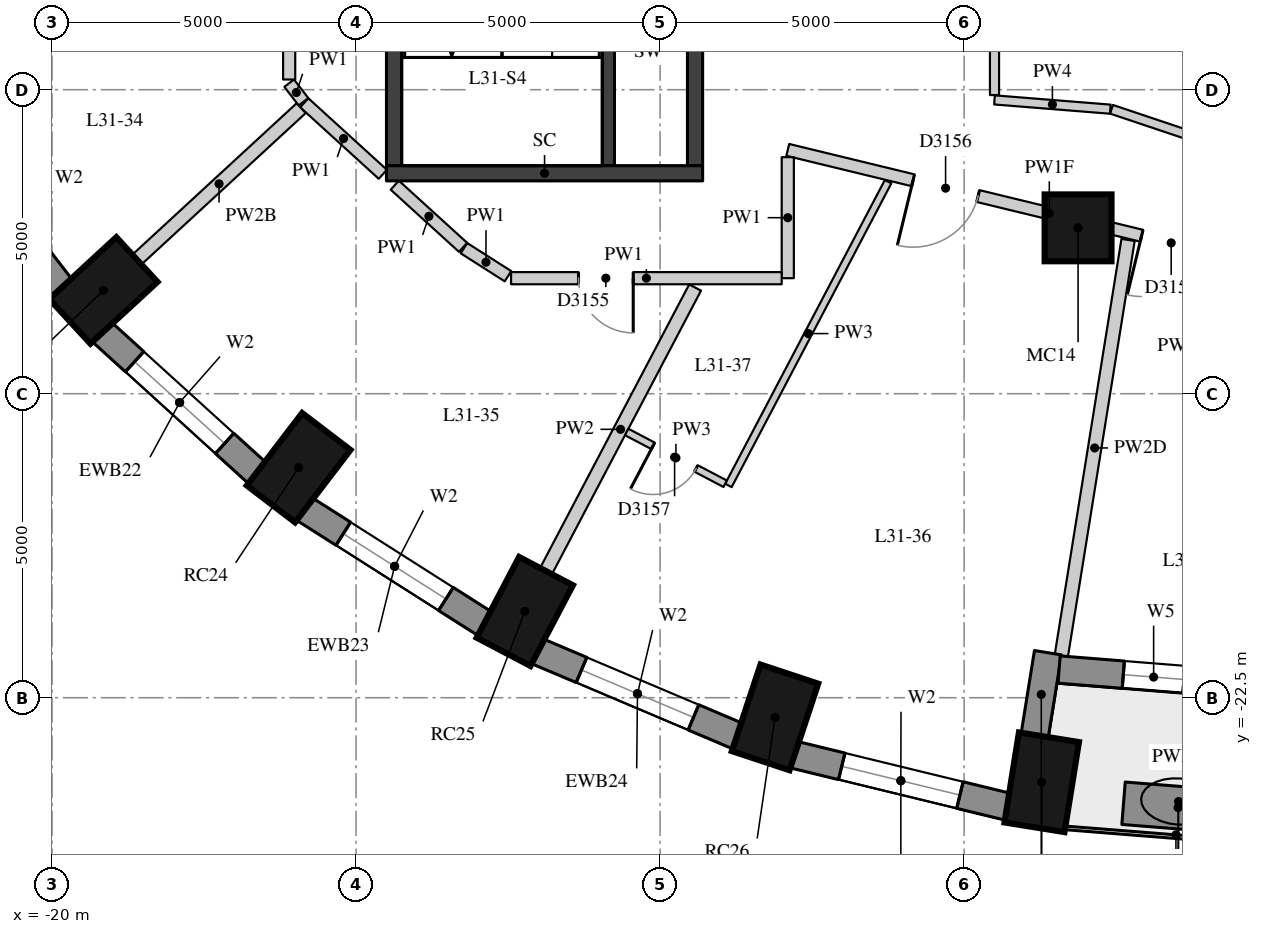
"""IFC4 building model, lengths in metres.
Left out: names, types, materials, properties, quantities, classifications, styles, units other than length and angle.
Written with IfcOpenShell. Run it as: python <this file> out.ifc"""

import sys

from ifc_helpers import new_model, si_unit, direction, frame, frame_2d, origin, origin_2d, place, context, subcontext, project, spatial, rectangle, extrude, element, fill, save


model = new_model("IFC4")
c1 = context("Model", 3, precision=1e-05, world=origin(), true_north=direction((0.0, 1.0)))
c2 = subcontext(c1, "Body", "Model", "MODEL_VIEW")
j1 = project(units=[si_unit("LENGTHUNIT", "METRE"), si_unit("PLANEANGLEUNIT", "RADIAN")], contexts=[c1])
p1 = place(None, origin())
s1 = spatial("IfcSite", under=j1, at=p1, CompositionType="ELEMENT")
p2 = place(p1, origin())
s2 = spatial("IfcBuilding", under=s1, at=p2, CompositionType="ELEMENT")
p3 = place(p2, frame((0.0, 0.0, 112.0)))
s3 = spatial("IfcBuildingStorey", under=s2, at=p3, CompositionType="ELEMENT", Elevation=112.0)
for number, where, z_axis, x_axis in (
    (1, (-19.156, -15.802, 0.0), (0.0, 0.0, 1.0), (-0.735, -0.678, 0.0)),
    (2, (-15.945, -18.717, 0.0), (0.0, 0.0, 1.0), (-0.607, -0.795, 0.0)),
    (3, (-12.225, -21.082, 0.0), (0.0, 0.0, 1.0), (-0.465, -0.885, 0.0)),
    (4, (-8.11, -22.824, 0.0), (0.0, 0.0, 1.0), (-0.315, -0.949, 0.0)),
    (5, (-3.724, -23.891, 0.0), (0.0, 0.0, 1.0), (-0.159, -0.987, 0.0)),
):
    element("IfcColumn", number, at=place(p3, frame(where, z_axis=z_axis, x_axis=x_axis)), inside=s3, PredefinedType="COLUMN", context=c2, shape_type="SweptSolid", body=[
        extrude(rectangle(XDim=1.5, YDim=1.0, at=origin_2d()), origin(), (0.0, 0.0, 1.0), 3.3),
    ])
p4 = place(p3, frame((-3.126, -14.772, 0.0), z_axis=(0.0, 0.0, 1.0), x_axis=(1.0, 0.0, 0.0)))
e6 = element("IfcColumn", 6, at=p4, inside=s3, PredefinedType="COLUMN", context=c2, shape_type="SweptSolid", body=[
    extrude(rectangle(XDim=1.1, YDim=1.1, at=origin_2d()), origin(), (0.0, 0.0, 1.0), 3.3),
])
p5 = place(p3, frame((-21.908, -13.087, 0.0), z_axis=(0.0, 0.0, 1.0), x_axis=(0.610693945156, -0.791866721961, 0.0)))
e7 = element("IfcWall", 7, at=p5, inside=s3, PredefinedType="SOLIDWALL", context=c2, shape_type="SweptSolid", body=[
    extrude(rectangle(XDim=3.395, YDim=0.45, at=frame_2d((1.697, 0.0))), origin(), (0.0, 0.0, 1.0), 3.02),
])
p6 = place(p5, frame((0.697, 0.0, 0.4)))
e8 = element("IfcOpeningElement", 8, at=p6, cuts=e7, PredefinedType="OPENING", context=c2, shape_type="SweptSolid", body=[
    extrude(rectangle(XDim=2.0, YDim=1.75, at=frame_2d((1.0, 0.875))), frame((0.0, 0.235, 0.0), z_axis=(0.0, -1.0, 0.0), x_axis=(1.0, 0.0, 0.0)), (0.0, 0.0, 1.0), 0.47),
])
p7 = place(p3, frame((-19.184, -16.481, 0.0), z_axis=(0.0, 0.0, 1.0), x_axis=(0.740364106106, -0.672206062446, 0.0)))
e9 = element("IfcWall", 9, at=p7, inside=s3, PredefinedType="SOLIDWALL", context=c2, shape_type="SweptSolid", body=[
    extrude(rectangle(XDim=3.464, YDim=0.45, at=frame_2d((1.732, 0.0))), origin(), (0.0, 0.0, 1.0), 3.02),
])
p8 = place(p7, frame((0.732, 0.0, 0.4)))
e10 = element("IfcOpeningElement", 10, at=p8, cuts=e9, PredefinedType="OPENING", context=c2, shape_type="SweptSolid", body=[
    extrude(rectangle(XDim=2.0, YDim=1.75, at=frame_2d((1.0, 0.875))), frame((0.0, 0.235, 0.0), z_axis=(0.0, -1.0, 0.0), x_axis=(1.0, 0.0, 0.0)), (0.0, 0.0, 1.0), 0.47),
])
p9 = place(p3, frame((-15.856, -19.392, 0.0), z_axis=(0.0, 0.0, 1.0), x_axis=(0.843891947083, -0.53651317006, 0.0)))
e11 = element("IfcWall", 11, at=p9, inside=s3, PredefinedType="SOLIDWALL", context=c2, shape_type="SweptSolid", body=[
    extrude(rectangle(XDim=3.532, YDim=0.45, at=frame_2d((1.766, 0.0))), origin(), (0.0, 0.0, 1.0), 3.02),
])
p10 = place(p9, frame((0.766, 0.0, 0.4)))
e12 = element("IfcOpeningElement", 12, at=p10, cuts=e11, PredefinedType="OPENING", context=c2, shape_type="SweptSolid", body=[
    extrude(rectangle(XDim=2.0, YDim=1.75, at=frame_2d((1.0, 0.875))), frame((0.0, 0.235, 0.0), z_axis=(0.0, -1.0, 0.0), x_axis=(1.0, 0.0, 0.0)), (0.0, 0.0, 1.0), 0.47),
])
p11 = place(p3, frame((-12.025, -21.733, 0.0), z_axis=(0.0, 0.0, 1.0), x_axis=(0.920879975612, -0.389846213932, 0.0)))
e13 = element("IfcWall", 13, at=p11, inside=s3, PredefinedType="SOLIDWALL", context=c2, shape_type="SweptSolid", body=[
    extrude(rectangle(XDim=3.592, YDim=0.45, at=frame_2d((1.796, 0.0))), origin(), (0.0, 0.0, 1.0), 3.02),
])
p12 = place(p11, frame((0.796, 0.0, 0.4)))
e14 = element("IfcOpeningElement", 14, at=p12, cuts=e13, PredefinedType="OPENING", context=c2, shape_type="SweptSolid", body=[
    extrude(rectangle(XDim=2.0, YDim=1.75, at=frame_2d((1.0, 0.875))), frame((0.0, 0.235, 0.0), z_axis=(0.0, -1.0, 0.0), x_axis=(1.0, 0.0, 0.0)), (0.0, 0.0, 1.0), 0.47),
])
p13 = place(p3, frame((-7.807, -23.435, 0.0), z_axis=(0.0, 0.0, 1.0), x_axis=(0.971667603162, -0.236351579148, 0.0)))
e15 = element("IfcWall", 15, at=p13, inside=s3, PredefinedType="SOLIDWALL", context=c2, shape_type="SweptSolid", body=[
    extrude(rectangle(XDim=3.635, YDim=0.45, at=frame_2d((1.817, 0.0))), origin(), (0.0, 0.0, 1.0), 3.02),
])
p14 = place(p13, frame((0.817, 0.0, 0.4)))
e16 = element("IfcOpeningElement", 16, at=p14, cuts=e15, PredefinedType="OPENING", context=c2, shape_type="SweptSolid", body=[
    extrude(rectangle(XDim=2.0, YDim=1.75, at=frame_2d((1.0, 0.875))), frame((0.0, 0.235, 0.0), z_axis=(0.0, -1.0, 0.0), x_axis=(1.0, 0.0, 0.0)), (0.0, 0.0, 1.0), 0.47),
])
p15 = place(p3, frame((-3.841, -23.132, 0.0), z_axis=(0.0, 0.0, 1.0), x_axis=(0.158442643832, 0.987368182906, 0.0)))
e17 = element("IfcWall", 17, at=p15, inside=s3, PredefinedType="SOLIDWALL", context=c2, shape_type="SweptSolid", body=[
    extrude(rectangle(XDim=1.39, YDim=0.45, at=frame_2d((0.695, 0.0))), origin(), (0.0, 0.0, 1.0), 2.47),
])
p16 = place(p3, frame((-3.438, -22.037, 0.0), z_axis=(0.0, 0.0, 1.0), x_axis=(0.996844307919, -0.079381520332, 0.0)))
e18 = element("IfcWall", 18, at=p16, inside=s3, PredefinedType="SOLIDWALL", context=c2, shape_type="SweptSolid", body=[
    extrude(rectangle(XDim=4.269, YDim=0.45, at=frame_2d((2.134, 0.0))), origin(), (0.0, 0.0, 1.0), 3.02),
])
p17 = place(p16, frame((1.06, 0.0, 0.4)))
e19 = element("IfcOpeningElement", 19, at=p17, cuts=e18, PredefinedType="OPENING", context=c2, shape_type="SweptSolid", body=[
    extrude(rectangle(XDim=1.0, YDim=1.75, at=frame_2d((0.5, 0.875))), frame((0.0, 0.235, 0.0), z_axis=(0.0, -1.0, 0.0), x_axis=(1.0, 0.0, 0.0)), (0.0, 0.0, 1.0), 0.47),
])
p18 = place(p16, frame((2.209, 0.0, 0.0)))
e20 = element("IfcOpeningElement", 20, at=p18, cuts=e18, PredefinedType="OPENING", context=c2, shape_type="SweptSolid", body=[
    extrude(rectangle(XDim=1.0, YDim=2.15, at=frame_2d((0.5, 1.075))), frame((0.0, 0.235, 0.0), z_axis=(0.0, -1.0, 0.0), x_axis=(1.0, 0.0, 0.0)), (0.0, 0.0, 1.0), 0.47),
])
p19 = place(p3, frame((-2.378, -24.236, 0.0), z_axis=(0.0, 0.0, 1.0), x_axis=(0.996858257414, -0.079206152698, 0.0)))
e21 = element("IfcWall", 21, at=p19, inside=s3, PredefinedType="USERDEFINED", context=c2, shape_type="SweptSolid", body=[
    extrude(rectangle(XDim=1.8, YDim=0.7, at=frame_2d((0.9, 0.0))), origin(), (0.0, 0.0, 1.0), 0.75),
])
p20 = place(p3, frame((-10.85, -13.75, 0.0), z_axis=(0.0, 0.0, 1.0), x_axis=(0.0, 1.0, 0.0)))
e22 = element("IfcWall", 22, at=p20, inside=s3, PredefinedType="SHEAR", context=c2, shape_type="SweptSolid", body=[
    extrude(rectangle(XDim=6.0, YDim=0.2, at=frame_2d((3.0, 0.0))), origin(), (0.0, 0.0, 1.0), 3.02),
])
p21 = place(p20, frame((4.4, 0.0, 0.0)))
e23 = element("IfcOpeningElement", 23, at=p21, cuts=e22, PredefinedType="OPENING", context=c2, shape_type="SweptSolid", body=[
    extrude(rectangle(XDim=1.5, YDim=2.1, at=frame_2d((0.75, 1.05))), frame((0.0, 0.11, 0.0), z_axis=(0.0, -1.0, 0.0), x_axis=(1.0, 0.0, 0.0)), (0.0, 0.0, 1.0), 0.22),
])
p22 = place(p3, frame((-14.375, -13.75, -0.28), z_axis=(0.0, 0.0, 1.0), x_axis=(0.0, 1.0, 0.0)))
e24 = element("IfcWall", 24, at=p22, inside=s3, PredefinedType="SHEAR", context=c2, shape_type="SweptSolid", body=[
    extrude(rectangle(XDim=6.0, YDim=0.25, at=frame_2d((3.0, 0.0))), origin(), (0.0, 0.0, 1.0), 3.3),
])
p23 = place(p3, frame((-9.425, -13.75, -0.28), z_axis=(0.0, 0.0, 1.0), x_axis=(0.0, 1.0, 0.0)))
e25 = element("IfcWall", 25, at=p23, inside=s3, PredefinedType="SHEAR", context=c2, shape_type="SweptSolid", body=[
    extrude(rectangle(XDim=6.0, YDim=0.25, at=frame_2d((3.0, 0.0))), origin(), (0.0, 0.0, 1.0), 3.3),
])
p24 = place(p23, frame((2.4, 0.0, 0.28)))
e26 = element("IfcOpeningElement", 26, at=p24, cuts=e25, PredefinedType="OPENING", context=c2, shape_type="SweptSolid", body=[
    extrude(rectangle(XDim=1.5, YDim=2.1, at=frame_2d((0.75, 1.05))), frame((0.0, 0.135, 0.0), z_axis=(0.0, -1.0, 0.0), x_axis=(1.0, 0.0, 0.0)), (0.0, 0.0, 1.0), 0.27),
])
p25 = place(p3, frame((-14.5, -13.875, -0.28), z_axis=(0.0, 0.0, 1.0), x_axis=(1.0, 0.0, 0.0)))
e27 = element("IfcWall", 27, at=p25, inside=s3, PredefinedType="SHEAR", context=c2, shape_type="SweptSolid", body=[
    extrude(rectangle(XDim=5.2, YDim=0.25, at=frame_2d((2.6, 0.0))), origin(), (0.0, 0.0, 1.0), 3.3),
])
p26 = place(p3, frame((-14.56, -13.891, 0.0), z_axis=(0.0, 0.0, 1.0), x_axis=(-0.739440483737, 0.673221932954, 0.0)))
e28 = element("IfcWall", 28, at=p26, inside=s3, PredefinedType="PARTITIONING", context=c2, shape_type="SweptSolid", body=[
    extrude(rectangle(XDim=1.748, YDim=0.2, at=frame_2d((0.874, 0.0))), origin(), (0.0, 0.0, 1.0), 3.02),
])
p27 = place(p3, frame((-15.864, -12.699, 0.0), z_axis=(0.0, 0.0, 1.0), x_axis=(-0.61004607296, 0.792365943782, 0.0)))
e29 = element("IfcWall", 29, at=p27, inside=s3, PredefinedType="PARTITIONING", context=c2, shape_type="SweptSolid", body=[
    extrude(rectangle(XDim=0.387, YDim=0.2, at=frame_2d((0.193, 0.0))), origin(), (0.0, 0.0, 1.0), 3.02),
])
p28 = place(p3, frame((-16.1, -12.332, 0.0), z_axis=(0.0, 0.0, 1.0), x_axis=(0.0, 1.0, 0.0)))
e30 = element("IfcWall", 30, at=p28, inside=s3, PredefinedType="PARTITIONING", context=c2, shape_type="SweptSolid", body=[
    extrude(rectangle(XDim=6.432, YDim=0.2, at=frame_2d((3.216, 0.0))), origin(), (0.0, 0.0, 1.0), 3.02),
])
p29 = place(p28, frame((1.304, 0.0, 0.0)))
e31 = element("IfcOpeningElement", 31, at=p29, cuts=e30, PredefinedType="OPENING", context=c2, shape_type="SweptSolid", body=[
    extrude(rectangle(XDim=0.9, YDim=2.1, at=frame_2d((0.45, 1.05))), frame((0.0, 0.11, 0.0), z_axis=(0.0, -1.0, 0.0), x_axis=(1.0, 0.0, 0.0)), (0.0, 0.0, 1.0), 0.22),
])
p30 = place(p3, frame((0.702, -15.577, 0.0), z_axis=(0.0, 0.0, 1.0), x_axis=(-0.971804733873, 0.235787105715, 0.0)))
e32 = element("IfcWall", 32, at=p30, inside=s3, PredefinedType="PARTITIONING", context=c2, shape_type="SweptSolid", body=[
    extrude(rectangle(XDim=8.852, YDim=0.2, at=frame_2d((4.426, 0.0))), origin(), (0.0, 0.0, 1.0), 2.42),
])
p31 = place(p30, frame((5.631, 0.0, 0.0)))
e33 = element("IfcOpeningElement", 33, at=p31, cuts=e32, PredefinedType="OPENING", context=c2, shape_type="SweptSolid", body=[
    extrude(rectangle(XDim=1.1, YDim=2.1, at=frame_2d((0.55, 1.05))), frame((0.0, 0.11, 0.0), z_axis=(0.0, -1.0, 0.0), x_axis=(1.0, 0.0, 0.0)), (0.0, 0.0, 1.0), 0.22),
])
p32 = place(p30, frame((1.863, 0.0, 0.0)))
e34 = element("IfcOpeningElement", 34, at=p32, cuts=e32, PredefinedType="OPENING", context=c2, shape_type="SweptSolid", body=[
    extrude(rectangle(XDim=1.0, YDim=2.1, at=frame_2d((0.5, 1.05))), frame((0.0, 0.11, 0.0), z_axis=(0.0, -1.0, 0.0), x_axis=(1.0, 0.0, 0.0)), (0.0, 0.0, 1.0), 0.22),
])
p33 = place(p3, frame((-7.9, -13.61, 0.0), z_axis=(0.0, 0.0, 1.0), x_axis=(0.0, -1.0, 0.0)))
e35 = element("IfcWall", 35, at=p33, inside=s3, PredefinedType="PARTITIONING", context=c2, shape_type="SweptSolid", body=[
    extrude(rectangle(XDim=1.99, YDim=0.2, at=frame_2d((0.995, 0.0))), origin(), (0.0, 0.0, 1.0), 3.02),
])
p34 = place(p3, frame((-8.0, -15.6, 0.0), z_axis=(0.0, 0.0, 1.0), x_axis=(-1.0, 0.0, 0.0)))
e36 = element("IfcWall", 36, at=p34, inside=s3, PredefinedType="PARTITIONING", context=c2, shape_type="SweptSolid", body=[
    extrude(rectangle(XDim=4.451, YDim=0.2, at=frame_2d((2.226, 0.0))), origin(), (0.0, 0.0, 1.0), 3.02),
])
p35 = place(p34, frame((2.442, 0.0, 0.0)))
e37 = element("IfcOpeningElement", 37, at=p35, cuts=e36, PredefinedType="OPENING", context=c2, shape_type="SweptSolid", body=[
    extrude(rectangle(XDim=0.9, YDim=2.1, at=frame_2d((0.45, 1.05))), frame((0.0, 0.11, 0.0), z_axis=(0.0, -1.0, 0.0), x_axis=(1.0, 0.0, 0.0)), (0.0, 0.0, 1.0), 0.22),
])
p36 = place(p3, frame((-12.501, -15.568, 0.0), z_axis=(0.0, 0.0, 1.0), x_axis=(-0.843169167706, 0.537648355926, 0.0)))
e38 = element("IfcWall", 38, at=p36, inside=s3, PredefinedType="PARTITIONING", context=c2, shape_type="SweptSolid", body=[
    extrude(rectangle(XDim=0.858, YDim=0.2, at=frame_2d((0.429, 0.0))), origin(), (0.0, 0.0, 1.0), 3.02),
])
p37 = place(p3, frame((-13.24, -15.093, 0.0), z_axis=(0.0, 0.0, 1.0), x_axis=(-0.739438095557, 0.673224556028, 0.0)))
e39 = element("IfcWall", 39, at=p37, inside=s3, PredefinedType="PARTITIONING", context=c2, shape_type="SweptSolid", body=[
    extrude(rectangle(XDim=1.519, YDim=0.2, at=frame_2d((0.76, 0.0))), origin(), (0.0, 0.0, 1.0), 3.02),
])
p38 = place(p3, frame((0.705, -13.922, 0.0), z_axis=(0.0, 0.0, 1.0), x_axis=(-0.948131483463, 0.317878420258, 0.0)))
e40 = element("IfcWall", 40, at=p38, inside=s3, PredefinedType="PARTITIONING", context=c2, shape_type="SweptSolid", body=[
    extrude(rectangle(XDim=3.46, YDim=0.15, at=frame_2d((1.73, 0.0))), origin(), (0.0, 0.0, 1.0), 3.02),
])
p39 = place(p3, frame((-2.596, -12.82, 0.0), z_axis=(0.0, 0.0, 1.0), x_axis=(-0.996815278536, 0.079745222283, 0.0)))
e41 = element("IfcWall", 41, at=p39, inside=s3, PredefinedType="PARTITIONING", context=c2, shape_type="SweptSolid", body=[
    extrude(rectangle(XDim=1.91, YDim=0.15, at=frame_2d((0.955, 0.0))), origin(), (0.0, 0.0, 1.0), 3.02),
])
p40 = place(p3, frame((-4.5, -12.588, 0.0), z_axis=(0.0, 0.0, 1.0), x_axis=(0.0, 1.0, 0.0)))
e42 = element("IfcWall", 42, at=p40, inside=s3, PredefinedType="PARTITIONING", context=c2, shape_type="SweptSolid", body=[
    extrude(rectangle(XDim=4.726, YDim=0.15, at=frame_2d((2.363, 0.0))), origin(), (0.0, 0.0, 1.0), 3.02),
])
p41 = place(p3, frame((-21.126, -12.023, 0.0), z_axis=(0.0, 0.0, 1.0), x_axis=(0.844499715613, 0.535556001114, 0.0)))
e43 = element("IfcWall", 43, at=p41, inside=s3, PredefinedType="PARTITIONING", context=c2, shape_type="SweptSolid", body=[
    extrude(rectangle(XDim=5.773, YDim=0.22, at=frame_2d((2.887, 0.0))), origin(), (0.0, 0.0, 1.0), 3.02),
])
p42 = place(p3, frame((-18.604, -15.294, 0.0), z_axis=(0.0, 0.0, 1.0), x_axis=(0.73529495628, 0.677747244383, 0.0)))
e44 = element("IfcWall", 44, at=p42, inside=s3, PredefinedType="PARTITIONING", context=c2, shape_type="SweptSolid", body=[
    extrude(rectangle(XDim=3.674, YDim=0.22, at=frame_2d((1.837, 0.0))), origin(), (0.0, 0.0, 1.0), 2.57),
])
p43 = place(p3, frame((-11.876, -20.418, 0.0), z_axis=(0.0, 0.0, 1.0), x_axis=(0.465320539057, 0.885142246157, 0.0)))
e45 = element("IfcWall", 45, at=p43, inside=s3, PredefinedType="PARTITIONING", context=c2, shape_type="SweptSolid", body=[
    extrude(rectangle(XDim=5.269, YDim=0.22, at=frame_2d((2.635, 0.0))), origin(), (0.0, 0.0, 1.0), 3.02),
])
p44 = place(p3, frame((-3.402, -21.814, 0.0), z_axis=(0.0, 0.0, 1.0), x_axis=(0.158512534522, 0.987356965033, 0.0)))
e46 = element("IfcWall", 46, at=p44, inside=s3, PredefinedType="PARTITIONING", context=c2, shape_type="SweptSolid", body=[
    extrude(rectangle(XDim=6.931, YDim=0.22, at=frame_2d((3.465, 0.0))), origin(), (0.0, 0.0, 1.0), 2.47),
])
p45 = place(p3, frame((-6.25, -14.013, 0.0), z_axis=(0.0, 0.0, 1.0), x_axis=(-0.465288210927, -0.885159240347, 0.0)))
e47 = element("IfcWall", 47, at=p45, inside=s3, PredefinedType="PARTITIONING", context=c2, shape_type="SweptSolid", body=[
    extrude(rectangle(XDim=5.644, YDim=0.12, at=frame_2d((2.822, 0.0))), origin(), (0.0, 0.0, 1.0), 3.02),
])
p46 = place(p3, frame((-8.929, -18.981, 0.0), z_axis=(0.0, 0.0, 1.0), x_axis=(-0.885114946598, 0.465372465139, 0.0)))
e48 = element("IfcWall", 48, at=p46, inside=s3, PredefinedType="PARTITIONING", context=c2, shape_type="SweptSolid", body=[
    extrude(rectangle(XDim=1.83, YDim=0.12, at=frame_2d((0.915, 0.0))), origin(), (0.0, 0.0, 1.0), 3.02),
])
p47 = place(p46, frame((0.54, 0.0, 0.0)))
e49 = element("IfcOpeningElement", 49, at=p47, cuts=e48, PredefinedType="OPENING", context=c2, shape_type="SweptSolid", body=[
    extrude(rectangle(XDim=0.8, YDim=2.1, at=frame_2d((0.4, 1.05))), frame((0.0, 0.07, 0.0), z_axis=(0.0, -1.0, 0.0), x_axis=(1.0, 0.0, 0.0)), (0.0, 0.0, 1.0), 0.14),
])
p48 = place(p8, origin())
e50 = element("IfcWindow", 50, at=p48, inside=s3, PartitioningType="SINGLE_PANEL", PredefinedType="WINDOW", context=c2, shape_type="SweptSolid", body=[
    extrude(rectangle(XDim=2.0, YDim=1.75, at=frame_2d((1.0, 0.875))), frame((0.0, 0.035, 0.0), z_axis=(0.0, -1.0, 0.0), x_axis=(1.0, 0.0, 0.0)), (0.0, 0.0, 1.0), 0.06),
])
fill(e10, e50)
p49 = place(p10, origin())
e51 = element("IfcWindow", 51, at=p49, inside=s3, PartitioningType="SINGLE_PANEL", PredefinedType="WINDOW", context=c2, shape_type="SweptSolid", body=[
    extrude(rectangle(XDim=2.0, YDim=1.75, at=frame_2d((1.0, 0.875))), frame((0.0, 0.035, 0.0), z_axis=(0.0, -1.0, 0.0), x_axis=(1.0, 0.0, 0.0)), (0.0, 0.0, 1.0), 0.06),
])
fill(e12, e51)
p50 = place(p12, origin())
e52 = element("IfcWindow", 52, at=p50, inside=s3, PartitioningType="SINGLE_PANEL", PredefinedType="WINDOW", context=c2, shape_type="SweptSolid", body=[
    extrude(rectangle(XDim=2.0, YDim=1.75, at=frame_2d((1.0, 0.875))), frame((0.0, 0.035, 0.0), z_axis=(0.0, -1.0, 0.0), x_axis=(1.0, 0.0, 0.0)), (0.0, 0.0, 1.0), 0.06),
])
fill(e14, e52)
p51 = place(p14, origin())
e53 = element("IfcWindow", 53, at=p51, inside=s3, PartitioningType="SINGLE_PANEL", PredefinedType="WINDOW", context=c2, shape_type="SweptSolid", body=[
    extrude(rectangle(XDim=2.0, YDim=1.75, at=frame_2d((1.0, 0.875))), frame((0.0, 0.035, 0.0), z_axis=(0.0, -1.0, 0.0), x_axis=(1.0, 0.0, 0.0)), (0.0, 0.0, 1.0), 0.06),
])
fill(e16, e53)
p52 = place(p17, origin())
e54 = element("IfcWindow", 54, at=p52, inside=s3, PartitioningType="SINGLE_PANEL", PredefinedType="WINDOW", context=c2, shape_type="SweptSolid", body=[
    extrude(rectangle(XDim=1.0, YDim=1.75, at=frame_2d((0.5, 0.875))), frame((0.0, 0.035, 0.0), z_axis=(0.0, -1.0, 0.0), x_axis=(1.0, 0.0, 0.0)), (0.0, 0.0, 1.0), 0.06),
])
fill(e19, e54)
p53 = place(p35, origin())
e55 = element("IfcDoor", 55, at=p53, inside=s3, OperationType="SINGLE_SWING_LEFT", PredefinedType="DOOR", context=c2, shape_type="SweptSolid", body=[
    extrude(rectangle(XDim=0.9, YDim=2.1, at=frame_2d((0.45, 1.05))), frame((0.0, 0.025, 0.0), z_axis=(0.0, -1.0, 0.0), x_axis=(1.0, 0.0, 0.0)), (0.0, 0.0, 1.0), 0.05),
])
fill(e37, e55)
p54 = place(p31, origin())
e56 = element("IfcDoor", 56, at=p54, inside=s3, OperationType="SINGLE_SWING_RIGHT", PredefinedType="DOOR", context=c2, shape_type="SweptSolid", body=[
    extrude(rectangle(XDim=1.1, YDim=2.1, at=frame_2d((0.55, 1.05))), frame((0.0, 0.025, 0.0), z_axis=(0.0, -1.0, 0.0), x_axis=(1.0, 0.0, 0.0)), (0.0, 0.0, 1.0), 0.05),
])
fill(e33, e56)
p55 = place(p47, origin())
e57 = element("IfcDoor", 57, at=p55, inside=s3, OperationType="SINGLE_SWING_RIGHT", PredefinedType="DOOR", context=c2, shape_type="SweptSolid", body=[
    extrude(rectangle(XDim=0.8, YDim=2.1, at=frame_2d((0.4, 1.05))), frame((0.0, 0.025, 0.0), z_axis=(0.0, -1.0, 0.0), x_axis=(1.0, 0.0, 0.0)), (0.0, 0.0, 1.0), 0.05),
])
fill(e49, e57)
p56 = place(p32, origin())
e58 = element("IfcDoor", 58, at=p56, inside=s3, OperationType="SINGLE_SWING_RIGHT", PredefinedType="DOOR", context=c2, shape_type="SweptSolid", body=[
    extrude(rectangle(XDim=1.0, YDim=2.1, at=frame_2d((0.5, 1.05))), frame((0.0, 0.025, 0.0), z_axis=(0.0, -1.0, 0.0), x_axis=(1.0, 0.0, 0.0)), (0.0, 0.0, 1.0), 0.05),
])
fill(e34, e58)
save(model, sys.argv[1])
